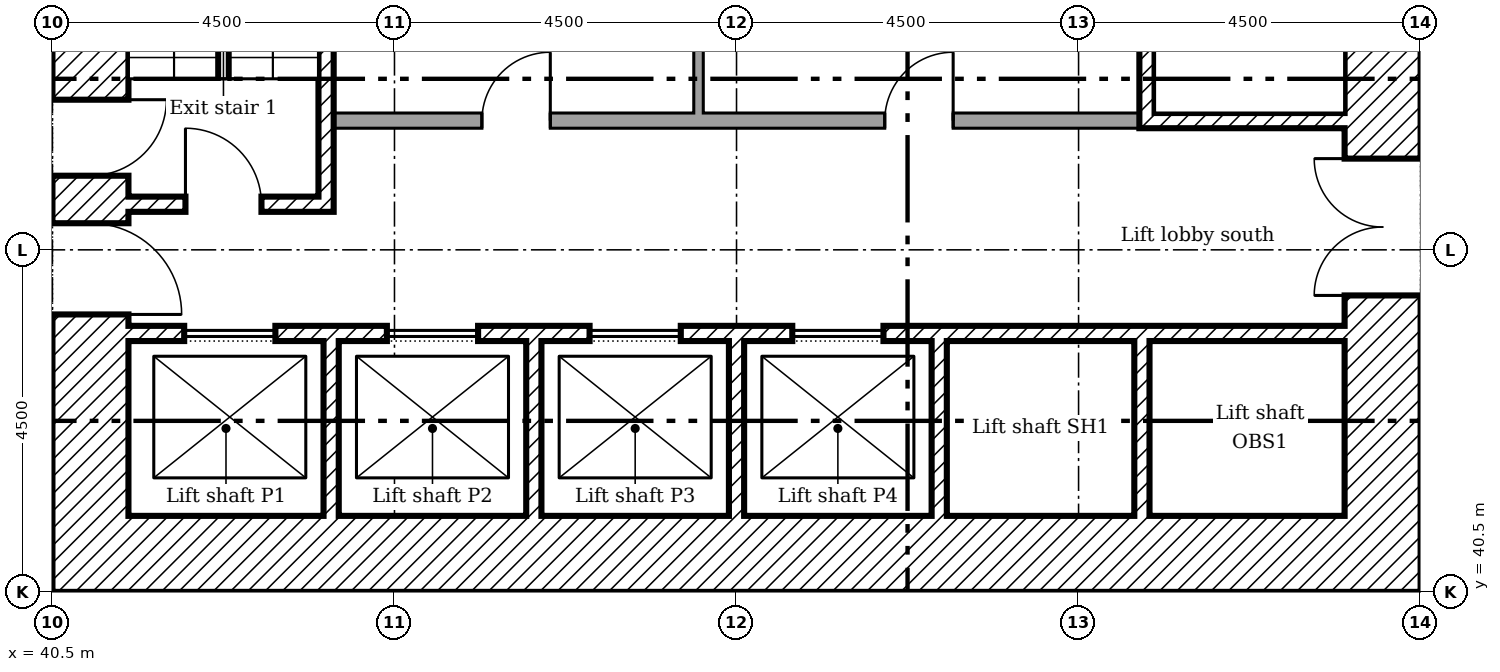
"""IFC4 building model, lengths in metres.
Left out: names, types, materials, properties, quantities, classifications, styles, units other than length and angle.
Written with IfcOpenShell. Run it as: python <this file> out.ifc"""

import sys

from ifc_helpers import new_model, si_unit, direction, frame, frame_2d, origin, place, context, subcontext, project, spatial, rectangle, extrude, element, fill, save


model = new_model("IFC4")
c1 = context("Model", 3, precision=1e-05, world=origin(), true_north=direction((0.0, 1.0)))
c2 = subcontext(c1, "Body", "Model", "MODEL_VIEW")
j1 = project(units=[si_unit("LENGTHUNIT", "METRE"), si_unit("PLANEANGLEUNIT", "RADIAN")], contexts=[c1])
p1 = place(None, origin())
s1 = spatial("IfcSite", under=j1, at=p1, CompositionType="ELEMENT")
p2 = place(p1, origin())
s2 = spatial("IfcBuilding", under=s1, at=p2, CompositionType="ELEMENT")
p3 = place(p2, frame((0.0, 0.0, 11.5)))
s3 = spatial("IfcBuildingStorey", under=s2, at=p3, CompositionType="ELEMENT", Elevation=11.5)
p4 = place(p3, frame((58.0, 40.5, 0.0), z_axis=(0.0, 0.0, 1.0), x_axis=(0.0, 1.0, 0.0)))
e1 = element("IfcWall", 1, at=p4, inside=s3, PredefinedType="SHEAR", context=c2, shape_type="SweptSolid", body=[
    extrude(rectangle(XDim=18.0, YDim=1.0, at=frame_2d((9.0, 0.0))), origin(), (0.0, 0.0, 1.0), 4.5),
])
p5 = place(p4, frame((13.15, 0.0, 0.0)))
e2 = element("IfcOpeningElement", 2, at=p5, cuts=e1, PredefinedType="OPENING", context=c2, shape_type="SweptSolid", body=[
    extrude(rectangle(XDim=1.2, YDim=2.1, at=frame_2d((0.6, 1.05))), frame((0.0, 0.51, 0.0), z_axis=(0.0, -1.0, 0.0), x_axis=(1.0, 0.0, 0.0)), (0.0, 0.0, 1.0), 1.02),
])
p6 = place(p4, frame((3.9, 0.0, 0.0)))
e3 = element("IfcOpeningElement", 3, at=p6, cuts=e1, PredefinedType="OPENING", context=c2, shape_type="SweptSolid", body=[
    extrude(rectangle(XDim=1.8, YDim=2.1, at=frame_2d((0.9, 1.05))), frame((0.0, 0.51, 0.0), z_axis=(0.0, -1.0, 0.0), x_axis=(1.0, 0.0, 0.0)), (0.0, 0.0, 1.0), 1.02),
])
p7 = place(p4, frame((11.525, 0.0, 0.0)))
e4 = element("IfcOpeningElement", 4, at=p7, cuts=e1, PredefinedType="OPENING", context=c2, shape_type="SweptSolid", body=[
    extrude(rectangle(XDim=1.0, YDim=2.1, at=frame_2d((0.5, 1.05))), frame((0.0, 0.51, 0.0), z_axis=(0.0, -1.0, 0.0), x_axis=(1.0, 0.0, 0.0)), (0.0, 0.0, 1.0), 1.02),
])
p8 = place(p3, frame((41.5, 41.0, 0.0)))
e5 = element("IfcWall", 5, at=p8, inside=s3, PredefinedType="SHEAR", context=c2, shape_type="SweptSolid", body=[
    extrude(rectangle(XDim=16.0, YDim=1.0, at=frame_2d((8.0, 0.0))), origin(), (0.0, 0.0, 1.0), 4.5),
])
p9 = place(p3, frame((41.0, 40.5, 0.0), z_axis=(0.0, 0.0, 1.0), x_axis=(0.0, 1.0, 0.0)))
e6 = element("IfcWall", 6, at=p9, inside=s3, PredefinedType="SHEAR", context=c2, shape_type="SweptSolid", body=[
    extrude(rectangle(XDim=18.0, YDim=1.0, at=frame_2d((9.0, 0.0))), origin(), (0.0, 0.0, 1.0), 4.5),
])
p10 = place(p9, frame((3.65, 0.0, 0.0)))
e7 = element("IfcOpeningElement", 7, at=p10, cuts=e6, PredefinedType="OPENING", context=c2, shape_type="SweptSolid", body=[
    extrude(rectangle(XDim=1.2, YDim=2.1, at=frame_2d((0.6, 1.05))), frame((0.0, 0.51, 0.0), z_axis=(0.0, -1.0, 0.0), x_axis=(1.0, 0.0, 0.0)), (0.0, 0.0, 1.0), 1.02),
])
p11 = place(p9, frame((5.475, 0.0, 0.0)))
e8 = element("IfcOpeningElement", 8, at=p11, cuts=e6, PredefinedType="OPENING", context=c2, shape_type="SweptSolid", body=[
    extrude(rectangle(XDim=1.0, YDim=2.1, at=frame_2d((0.5, 1.05))), frame((0.0, 0.51, 0.0), z_axis=(0.0, -1.0, 0.0), x_axis=(1.0, 0.0, 0.0)), (0.0, 0.0, 1.0), 1.02),
])
p12 = place(p9, frame((12.3, 0.0, 0.0)))
e9 = element("IfcOpeningElement", 9, at=p12, cuts=e6, PredefinedType="OPENING", context=c2, shape_type="SweptSolid", body=[
    extrude(rectangle(XDim=1.0, YDim=2.1, at=frame_2d((0.5, 1.05))), frame((0.0, 0.51, 0.0), z_axis=(0.0, -1.0, 0.0), x_axis=(1.0, 0.0, 0.0)), (0.0, 0.0, 1.0), 1.02),
])
for number, where, z_axis, x_axis in (
    (10, (44.167, 41.5, 0.0), (0.0, 0.0, 1.0), (0.0, 1.0, 0.0)),
    (11, (46.833, 41.5, 0.0), (0.0, 0.0, 1.0), (0.0, 1.0, 0.0)),
    (12, (49.5, 41.5, 0.0), (0.0, 0.0, 1.0), (0.0, 1.0, 0.0)),
    (13, (52.167, 41.5, 0.0), (0.0, 0.0, 1.0), (0.0, 1.0, 0.0)),
    (14, (54.833, 41.5, 0.0), (0.0, 0.0, 1.0), (0.0, 1.0, 0.0)),
):
    element("IfcWall", number, at=place(p3, frame(where, z_axis=z_axis, x_axis=x_axis)), inside=s3, PredefinedType="SHEAR", context=c2, shape_type="SweptSolid", body=[
        extrude(rectangle(XDim=2.3, YDim=0.2, at=frame_2d((1.15, 0.0))), origin(), (0.0, 0.0, 1.0), 4.5),
    ])
p13 = place(p3, frame((41.5, 43.9, 0.0)))
e15 = element("IfcWall", 15, at=p13, inside=s3, PredefinedType="SHEAR", context=c2, shape_type="SweptSolid", body=[
    extrude(rectangle(XDim=16.0, YDim=0.2, at=frame_2d((8.0, 0.0))), origin(), (0.0, 0.0, 1.0), 4.5),
])
p14 = place(p13, frame((0.733, 0.0, 0.0)))
e16 = element("IfcOpeningElement", 16, at=p14, cuts=e15, PredefinedType="OPENING", context=c2, shape_type="SweptSolid", body=[
    extrude(rectangle(XDim=1.2, YDim=2.1, at=frame_2d((0.6, 1.05))), frame((0.0, 0.11, 0.0), z_axis=(0.0, -1.0, 0.0), x_axis=(1.0, 0.0, 0.0)), (0.0, 0.0, 1.0), 0.22),
])
p15 = place(p13, frame((3.4, 0.0, 0.0)))
e17 = element("IfcOpeningElement", 17, at=p15, cuts=e15, PredefinedType="OPENING", context=c2, shape_type="SweptSolid", body=[
    extrude(rectangle(XDim=1.2, YDim=2.1, at=frame_2d((0.6, 1.05))), frame((0.0, 0.11, 0.0), z_axis=(0.0, -1.0, 0.0), x_axis=(1.0, 0.0, 0.0)), (0.0, 0.0, 1.0), 0.22),
])
p16 = place(p13, frame((6.067, 0.0, 0.0)))
e18 = element("IfcOpeningElement", 18, at=p16, cuts=e15, PredefinedType="OPENING", context=c2, shape_type="SweptSolid", body=[
    extrude(rectangle(XDim=1.2, YDim=2.1, at=frame_2d((0.6, 1.05))), frame((0.0, 0.11, 0.0), z_axis=(0.0, -1.0, 0.0), x_axis=(1.0, 0.0, 0.0)), (0.0, 0.0, 1.0), 0.22),
])
p17 = place(p13, frame((8.733, 0.0, 0.0)))
e19 = element("IfcOpeningElement", 19, at=p17, cuts=e15, PredefinedType="OPENING", context=c2, shape_type="SweptSolid", body=[
    extrude(rectangle(XDim=1.2, YDim=2.1, at=frame_2d((0.6, 1.05))), frame((0.0, 0.11, 0.0), z_axis=(0.0, -1.0, 0.0), x_axis=(1.0, 0.0, 0.0)), (0.0, 0.0, 1.0), 0.22),
])
p18 = place(p3, frame((44.1, 45.5, 0.0), z_axis=(0.0, 0.0, 1.0), x_axis=(0.0, 1.0, 0.0)))
e20 = element("IfcWall", 20, at=p18, inside=s3, PredefinedType="SHEAR", context=c2, shape_type="SweptSolid", body=[
    extrude(rectangle(XDim=6.9, YDim=0.2, at=frame_2d((3.45, 0.0))), origin(), (0.0, 0.0, 1.0), 4.5),
])
p19 = place(p3, frame((41.5, 45.6, 0.0)))
e21 = element("IfcWall", 21, at=p19, inside=s3, PredefinedType="SHEAR", context=c2, shape_type="SweptSolid", body=[
    extrude(rectangle(XDim=2.5, YDim=0.2, at=frame_2d((1.25, 0.0))), origin(), (0.0, 0.0, 1.0), 4.5),
])
p20 = place(p19, frame((0.75, 0.0, 0.0)))
e22 = element("IfcOpeningElement", 22, at=p20, cuts=e21, PredefinedType="OPENING", context=c2, shape_type="SweptSolid", body=[
    extrude(rectangle(XDim=1.0, YDim=2.1, at=frame_2d((0.5, 1.05))), frame((0.0, 0.11, 0.0), z_axis=(0.0, -1.0, 0.0), x_axis=(1.0, 0.0, 0.0)), (0.0, 0.0, 1.0), 0.22),
])
p21 = place(p3, frame((54.8, 46.7, 0.0)))
e23 = element("IfcWall", 23, at=p21, inside=s3, PredefinedType="SHEAR", context=c2, shape_type="SweptSolid", body=[
    extrude(rectangle(XDim=2.7, YDim=0.2, at=frame_2d((1.35, 0.0))), origin(), (0.0, 0.0, 1.0), 4.5),
])
p22 = place(p3, frame((54.9, 46.8, 0.0), z_axis=(0.0, 0.0, 1.0), x_axis=(0.0, 1.0, 0.0)))
e24 = element("IfcWall", 24, at=p22, inside=s3, PredefinedType="SHEAR", context=c2, shape_type="SweptSolid", body=[
    extrude(rectangle(XDim=6.5, YDim=0.2, at=frame_2d((3.25, 0.0))), origin(), (0.0, 0.0, 1.0), 4.5),
])
p23 = place(p3, frame((44.2, 46.7, 0.0)))
e25 = element("IfcWall", 25, at=p23, inside=s3, PredefinedType="PARTITIONING", context=c2, shape_type="SweptSolid", body=[
    extrude(rectangle(XDim=10.6, YDim=0.2, at=frame_2d((5.3, 0.0))), origin(), (0.0, 0.0, 1.0), 4.5),
])
p24 = place(p23, frame((1.95, 0.0, 0.0)))
e26 = element("IfcOpeningElement", 26, at=p24, cuts=e25, PredefinedType="OPENING", context=c2, shape_type="SweptSolid", body=[
    extrude(rectangle(XDim=0.9, YDim=2.1, at=frame_2d((0.45, 1.05))), frame((0.0, 0.11, 0.0), z_axis=(0.0, -1.0, 0.0), x_axis=(1.0, 0.0, 0.0)), (0.0, 0.0, 1.0), 0.22),
])
p25 = place(p23, frame((7.25, 0.0, 0.0)))
e27 = element("IfcOpeningElement", 27, at=p25, cuts=e25, PredefinedType="OPENING", context=c2, shape_type="SweptSolid", body=[
    extrude(rectangle(XDim=0.9, YDim=2.1, at=frame_2d((0.45, 1.05))), frame((0.0, 0.11, 0.0), z_axis=(0.0, -1.0, 0.0), x_axis=(1.0, 0.0, 0.0)), (0.0, 0.0, 1.0), 0.22),
])
p26 = place(p3, frame((49.0, 46.8, 0.0), z_axis=(0.0, 0.0, 1.0), x_axis=(0.0, 1.0, 0.0)))
e28 = element("IfcWall", 28, at=p26, inside=s3, PredefinedType="PARTITIONING", context=c2, shape_type="SweptSolid", body=[
    extrude(rectangle(XDim=2.363, YDim=0.125, at=frame_2d((1.181, 0.0))), origin(), (0.0, 0.0, 1.0), 4.5),
])
p27 = place(p6, origin())
e29 = element("IfcDoor", 29, at=p27, inside=s3, OperationType="DOUBLE_DOOR_SINGLE_SWING", PredefinedType="DOOR", context=c2, shape_type="SweptSolid", body=[
    extrude(rectangle(XDim=1.8, YDim=2.1, at=frame_2d((0.9, 1.05))), frame((0.0, 0.025, 0.0), z_axis=(0.0, -1.0, 0.0), x_axis=(1.0, 0.0, 0.0)), (0.0, 0.0, 1.0), 0.05),
])
fill(e3, e29)
p28 = place(p10, frame((1.2, 0.0, 0.0), x_axis=(-1.0, 0.0, 0.0)))
e30 = element("IfcDoor", 30, at=p28, inside=s3, OperationType="SINGLE_SWING_LEFT", PredefinedType="DOOR", context=c2, shape_type="SweptSolid", body=[
    extrude(rectangle(XDim=1.2, YDim=2.1, at=frame_2d((0.6, 1.05))), frame((0.0, 0.025, 0.0), z_axis=(0.0, -1.0, 0.0), x_axis=(1.0, 0.0, 0.0)), (0.0, 0.0, 1.0), 0.05),
])
fill(e7, e30)
p29 = place(p20, origin())
e31 = element("IfcDoor", 31, at=p29, inside=s3, OperationType="SINGLE_SWING_RIGHT", PredefinedType="DOOR", context=c2, shape_type="SweptSolid", body=[
    extrude(rectangle(XDim=1.0, YDim=2.1, at=frame_2d((0.5, 1.05))), frame((0.0, 0.025, 0.0), z_axis=(0.0, -1.0, 0.0), x_axis=(1.0, 0.0, 0.0)), (0.0, 0.0, 1.0), 0.05),
])
fill(e22, e31)
p30 = place(p11, frame((1.0, 0.0, 0.0), x_axis=(-1.0, 0.0, 0.0)))
e32 = element("IfcDoor", 32, at=p30, inside=s3, OperationType="SINGLE_SWING_RIGHT", PredefinedType="DOOR", context=c2, shape_type="SweptSolid", body=[
    extrude(rectangle(XDim=1.0, YDim=2.1, at=frame_2d((0.5, 1.05))), frame((0.0, 0.025, 0.0), z_axis=(0.0, -1.0, 0.0), x_axis=(1.0, 0.0, 0.0)), (0.0, 0.0, 1.0), 0.05),
])
fill(e8, e32)
p31 = place(p24, origin())
e33 = element("IfcDoor", 33, at=p31, inside=s3, OperationType="SINGLE_SWING_LEFT", PredefinedType="DOOR", context=c2, shape_type="SweptSolid", body=[
    extrude(rectangle(XDim=0.9, YDim=2.1, at=frame_2d((0.45, 1.05))), frame((0.0, 0.025, 0.0), z_axis=(0.0, -1.0, 0.0), x_axis=(1.0, 0.0, 0.0)), (0.0, 0.0, 1.0), 0.05),
])
fill(e26, e33)
p32 = place(p25, origin())
e34 = element("IfcDoor", 34, at=p32, inside=s3, OperationType="SINGLE_SWING_LEFT", PredefinedType="DOOR", context=c2, shape_type="SweptSolid", body=[
    extrude(rectangle(XDim=0.9, YDim=2.1, at=frame_2d((0.45, 1.05))), frame((0.0, 0.025, 0.0), z_axis=(0.0, -1.0, 0.0), x_axis=(1.0, 0.0, 0.0)), (0.0, 0.0, 1.0), 0.05),
])
fill(e27, e34)
p33 = place(p14, origin())
e35 = element("IfcDoor", 35, at=p33, inside=s3, OperationType="SLIDING_TO_LEFT", PredefinedType="DOOR", context=c2, shape_type="SweptSolid", body=[
    extrude(rectangle(XDim=1.2, YDim=2.1, at=frame_2d((0.6, 1.05))), frame((0.0, 0.025, 0.0), z_axis=(0.0, -1.0, 0.0), x_axis=(1.0, 0.0, 0.0)), (0.0, 0.0, 1.0), 0.05),
])
fill(e16, e35)
p34 = place(p15, origin())
e36 = element("IfcDoor", 36, at=p34, inside=s3, OperationType="SLIDING_TO_LEFT", PredefinedType="DOOR", context=c2, shape_type="SweptSolid", body=[
    extrude(rectangle(XDim=1.2, YDim=2.1, at=frame_2d((0.6, 1.05))), frame((0.0, 0.025, 0.0), z_axis=(0.0, -1.0, 0.0), x_axis=(1.0, 0.0, 0.0)), (0.0, 0.0, 1.0), 0.05),
])
fill(e17, e36)
p35 = place(p16, origin())
e37 = element("IfcDoor", 37, at=p35, inside=s3, OperationType="SLIDING_TO_LEFT", PredefinedType="DOOR", context=c2, shape_type="SweptSolid", body=[
    extrude(rectangle(XDim=1.2, YDim=2.1, at=frame_2d((0.6, 1.05))), frame((0.0, 0.025, 0.0), z_axis=(0.0, -1.0, 0.0), x_axis=(1.0, 0.0, 0.0)), (0.0, 0.0, 1.0), 0.05),
])
fill(e18, e37)
p36 = place(p17, origin())
e38 = element("IfcDoor", 38, at=p36, inside=s3, OperationType="SLIDING_TO_LEFT", PredefinedType="DOOR", context=c2, shape_type="SweptSolid", body=[
    extrude(rectangle(XDim=1.2, YDim=2.1, at=frame_2d((0.6, 1.05))), frame((0.0, 0.025, 0.0), z_axis=(0.0, -1.0, 0.0), x_axis=(1.0, 0.0, 0.0)), (0.0, 0.0, 1.0), 0.05),
])
fill(e19, e38)
save(model, sys.argv[1])
